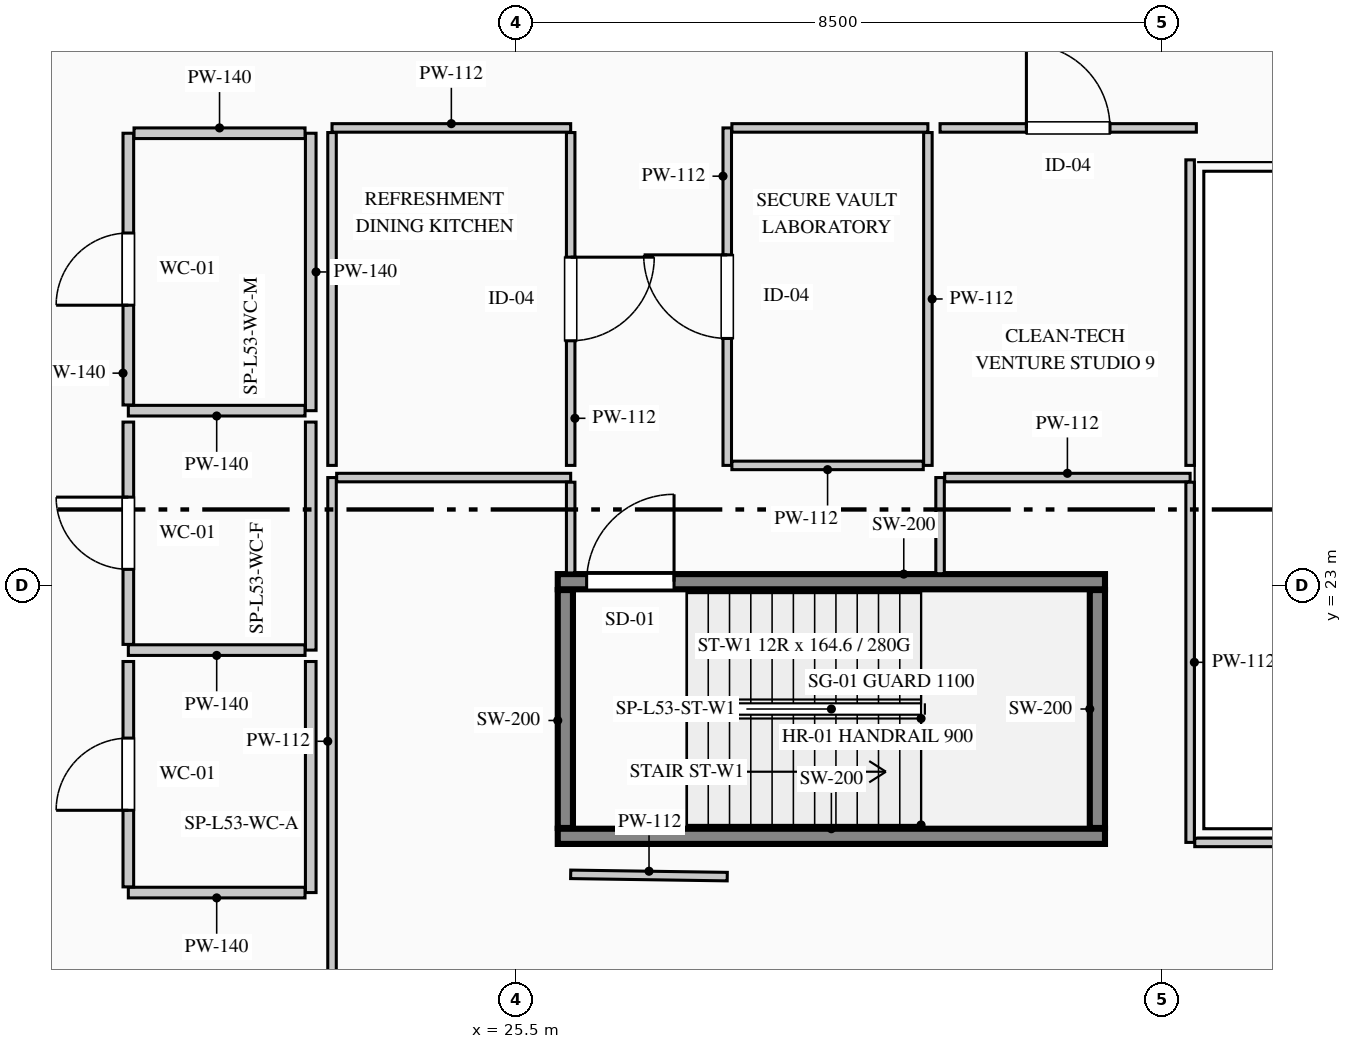
"""IFC4 building model, lengths in metres.
Left out: names, types, materials, properties, quantities, classifications, styles, units other than length and angle.
Written with IfcOpenShell. Run it as: python <this file> out.ifc"""

import sys

from ifc_helpers import new_model, si_unit, direction, frame, frame_2d, origin, place, context, subcontext, project, spatial, rectangle, extrude, element, fill, save


model = new_model("IFC4")
c1 = context("Model", 3, precision=1e-05, world=origin(), true_north=direction((0.0, 1.0)))
c2 = subcontext(c1, "Body", "Model", "MODEL_VIEW")
j1 = project(units=[si_unit("LENGTHUNIT", "METRE"), si_unit("PLANEANGLEUNIT", "RADIAN")], contexts=[c1])
p1 = place(None, origin())
s1 = spatial("IfcSite", under=j1, at=p1, CompositionType="ELEMENT")
p2 = place(p1, origin())
s2 = spatial("IfcBuilding", under=s1, at=p2, CompositionType="ELEMENT")
p3 = place(p2, frame((0.0, 0.0, 223.25)))
s3 = spatial("IfcBuildingStorey", under=s2, at=p3, CompositionType="ELEMENT", Elevation=223.25)
p4 = place(p3, frame((26.05, 19.7, 0.0), z_axis=(0.0, 0.0, 1.0), x_axis=(1.0, 0.0, 0.0)))
e1 = element("IfcWall", 1, at=p4, inside=s3, PredefinedType="SHEAR", context=c2, shape_type="SweptSolid", body=[
    extrude(rectangle(XDim=7.2, YDim=0.2, at=frame_2d((3.6, 0.0))), origin(), (0.0, 0.0, 1.0), 3.95),
])
p5 = place(p3, frame((26.05, 23.05, 0.0), z_axis=(0.0, 0.0, 1.0), x_axis=(1.0, 0.0, 0.0)))
e2 = element("IfcWall", 2, at=p5, inside=s3, PredefinedType="SHEAR", context=c2, shape_type="SweptSolid", body=[
    extrude(rectangle(XDim=7.2, YDim=0.2, at=frame_2d((3.6, 0.0))), origin(), (0.0, 0.0, 1.0), 3.95),
])
p6 = place(p5, frame((0.38, 0.0, 0.0)))
e3 = element("IfcOpeningElement", 3, at=p6, cuts=e2, PredefinedType="OPENING", context=c2, shape_type="SweptSolid", body=[
    extrude(rectangle(XDim=1.15, YDim=2.2, at=frame_2d((0.575, 1.1))), frame((0.0, 0.11, 0.0), z_axis=(0.0, -1.0, 0.0), x_axis=(1.0, 0.0, 0.0)), (0.0, 0.0, 1.0), 0.22),
])
for number, where, z_axis, x_axis in (
    (4, (26.15, 19.81, 0.0), (0.0, 0.0, 1.0), (0.0, 1.0, 0.0)),
    (5, (33.15, 19.81, 0.0), (0.0, 0.0, 1.0), (0.0, 1.0, 0.0)),
):
    element("IfcWall", number, at=place(p3, frame(where, z_axis=z_axis, x_axis=x_axis)), inside=s3, PredefinedType="SHEAR", context=c2, shape_type="SweptSolid", body=[
        extrude(rectangle(XDim=3.13, YDim=0.2, at=frame_2d((1.565, 0.0))), origin(), (0.0, 0.0, 1.0), 3.95),
    ])
p7 = place(p3, frame((22.8, 28.95, 0.0), z_axis=(0.0, 0.0, 1.0), x_axis=(0.0, -1.0, 0.0)))
e6 = element("IfcWall", 6, at=p7, inside=s3, PredefinedType="PARTITIONING", context=c2, shape_type="SweptSolid", body=[
    extrude(rectangle(XDim=3.65, YDim=0.14, at=frame_2d((1.825, 0.0))), origin(), (0.0, 0.0, 1.0), 3.385),
])
p8 = place(p3, frame((22.725, 25.3, 0.0), z_axis=(0.0, 0.0, 1.0), x_axis=(-1.0, 0.0, 0.0)))
e7 = element("IfcWall", 7, at=p8, inside=s3, PredefinedType="PARTITIONING", context=c2, shape_type="SweptSolid", body=[
    extrude(rectangle(XDim=2.325, YDim=0.14, at=frame_2d((1.163, 0.0))), origin(), (0.0, 0.0, 1.0), 3.7),
])
p9 = place(p3, frame((20.4, 25.375, 0.0), z_axis=(0.0, 0.0, 1.0), x_axis=(0.0, 1.0, 0.0)))
e8 = element("IfcWall", 8, at=p9, inside=s3, PredefinedType="PARTITIONING", context=c2, shape_type="SweptSolid", body=[
    extrude(rectangle(XDim=3.575, YDim=0.14, at=frame_2d((1.788, 0.0))), origin(), (0.0, 0.0, 1.0), 3.7),
])
p10 = place(p9, frame((1.312, 0.0, 0.0)))
e9 = element("IfcOpeningElement", 9, at=p10, cuts=e8, PredefinedType="OPENING", context=c2, shape_type="SweptSolid", body=[
    extrude(rectangle(XDim=0.95, YDim=2.15, at=frame_2d((0.475, 1.075))), frame((0.0, 0.08, 0.0), z_axis=(0.0, -1.0, 0.0), x_axis=(1.0, 0.0, 0.0)), (0.0, 0.0, 1.0), 0.16),
])
p11 = place(p3, frame((20.475, 28.95, 0.0), z_axis=(0.0, 0.0, 1.0), x_axis=(1.0, 0.0, 0.0)))
e10 = element("IfcWall", 10, at=p11, inside=s3, PredefinedType="PARTITIONING", context=c2, shape_type="SweptSolid", body=[
    extrude(rectangle(XDim=2.25, YDim=0.14, at=frame_2d((1.125, 0.0))), origin(), (0.0, 0.0, 1.0), 3.7),
])
p12 = place(p3, frame((22.8, 25.15, 0.0), z_axis=(0.0, 0.0, 1.0), x_axis=(0.0, -1.0, 0.0)))
e11 = element("IfcWall", 11, at=p12, inside=s3, PredefinedType="PARTITIONING", context=c2, shape_type="SweptSolid", body=[
    extrude(rectangle(XDim=3.0, YDim=0.14, at=frame_2d((1.5, 0.0))), origin(), (0.0, 0.0, 1.0), 3.385),
])
p13 = place(p3, frame((22.725, 22.15, 0.0), z_axis=(0.0, 0.0, 1.0), x_axis=(-1.0, 0.0, 0.0)))
e12 = element("IfcWall", 12, at=p13, inside=s3, PredefinedType="PARTITIONING", context=c2, shape_type="SweptSolid", body=[
    extrude(rectangle(XDim=2.325, YDim=0.14, at=frame_2d((1.163, 0.0))), origin(), (0.0, 0.0, 1.0), 3.7),
])
p14 = place(p3, frame((20.4, 22.225, 0.0), z_axis=(0.0, 0.0, 1.0), x_axis=(0.0, 1.0, 0.0)))
e13 = element("IfcWall", 13, at=p14, inside=s3, PredefinedType="PARTITIONING", context=c2, shape_type="SweptSolid", body=[
    extrude(rectangle(XDim=2.925, YDim=0.14, at=frame_2d((1.462, 0.0))), origin(), (0.0, 0.0, 1.0), 3.7),
])
p15 = place(p14, frame((0.988, 0.0, 0.0)))
e14 = element("IfcOpeningElement", 14, at=p15, cuts=e13, PredefinedType="OPENING", context=c2, shape_type="SweptSolid", body=[
    extrude(rectangle(XDim=0.95, YDim=2.15, at=frame_2d((0.475, 1.075))), frame((0.0, 0.08, 0.0), z_axis=(0.0, -1.0, 0.0), x_axis=(1.0, 0.0, 0.0)), (0.0, 0.0, 1.0), 0.16),
])
p16 = place(p3, frame((22.8, 22.0, 0.0), z_axis=(0.0, 0.0, 1.0), x_axis=(0.0, -1.0, 0.0)))
e15 = element("IfcWall", 15, at=p16, inside=s3, PredefinedType="PARTITIONING", context=c2, shape_type="SweptSolid", body=[
    extrude(rectangle(XDim=3.04, YDim=0.14, at=frame_2d((1.52, 0.0))), origin(), (0.0, 0.0, 1.0), 3.385),
])
p17 = place(p3, frame((22.725, 18.96, 0.0), z_axis=(0.0, 0.0, 1.0), x_axis=(-1.0, 0.0, 0.0)))
e16 = element("IfcWall", 16, at=p17, inside=s3, PredefinedType="PARTITIONING", context=c2, shape_type="SweptSolid", body=[
    extrude(rectangle(XDim=2.325, YDim=0.14, at=frame_2d((1.163, 0.0))), origin(), (0.0, 0.0, 1.0), 3.7),
])
p18 = place(p3, frame((20.4, 19.035, 0.0), z_axis=(0.0, 0.0, 1.0), x_axis=(0.0, 1.0, 0.0)))
e17 = element("IfcWall", 17, at=p18, inside=s3, PredefinedType="PARTITIONING", context=c2, shape_type="SweptSolid", body=[
    extrude(rectangle(XDim=2.965, YDim=0.14, at=frame_2d((1.482, 0.0))), origin(), (0.0, 0.0, 1.0), 3.7),
])
p19 = place(p18, frame((1.008, 0.0, 0.0)))
e18 = element("IfcOpeningElement", 18, at=p19, cuts=e17, PredefinedType="OPENING", context=c2, shape_type="SweptSolid", body=[
    extrude(rectangle(XDim=0.95, YDim=2.15, at=frame_2d((0.475, 1.075))), frame((0.0, 0.08, 0.0), z_axis=(0.0, -1.0, 0.0), x_axis=(1.0, 0.0, 0.0)), (0.0, 0.0, 1.0), 0.16),
])
p20 = place(p3, frame((31.08, 23.155, 0.0), z_axis=(0.0, 0.0, 1.0), x_axis=(0.0, 1.0, 0.0)))
e19 = element("IfcWall", 19, at=p20, inside=s3, PredefinedType="PARTITIONING", context=c2, shape_type="SweptSolid", body=[
    extrude(rectangle(XDim=1.265, YDim=0.112, at=frame_2d((0.632, 0.0))), origin(), (0.0, 0.0, 1.0), 3.7),
])
p21 = place(p3, frame((31.141, 24.42, 0.0), z_axis=(0.0, 0.0, 1.0), x_axis=(1.0, 0.0, 0.0)))
e20 = element("IfcWall", 20, at=p21, inside=s3, PredefinedType="PARTITIONING", context=c2, shape_type="SweptSolid", body=[
    extrude(rectangle(XDim=3.229, YDim=0.112, at=frame_2d((1.615, 0.0))), origin(), (0.0, 0.0, 1.0), 3.385),
])
p22 = place(p3, frame((34.37, 24.359, 0.0), z_axis=(0.0, 0.0, 1.0), x_axis=(0.0, -1.0, 0.0)))
e21 = element("IfcWall", 21, at=p22, inside=s3, PredefinedType="PARTITIONING", context=c2, shape_type="SweptSolid", body=[
    extrude(rectangle(XDim=4.739, YDim=0.112, at=frame_2d((2.369, 0.0))), origin(), (0.0, 0.0, 1.0), 3.7),
])
p23 = place(p3, frame((34.431, 19.62, 0.0), z_axis=(0.0, 0.0, 1.0), x_axis=(1.0, 0.0, 0.0)))
e22 = element("IfcWall", 22, at=p23, inside=s3, PredefinedType="PARTITIONING", context=c2, shape_type="SweptSolid", body=[
    extrude(rectangle(XDim=4.989, YDim=0.112, at=frame_2d((2.495, 0.0))), origin(), (0.0, 0.0, 1.0), 3.7),
])
p24 = place(p3, frame((23.08, 17.481, 0.0), z_axis=(0.0, 0.0, 1.0), x_axis=(0.0, 1.0, 0.0)))
e23 = element("IfcWall", 23, at=p24, inside=s3, PredefinedType="PARTITIONING", context=c2, shape_type="SweptSolid", body=[
    extrude(rectangle(XDim=6.939, YDim=0.112, at=frame_2d((3.469, 0.0))), origin(), (0.0, 0.0, 1.0), 3.385),
])
p25 = place(p3, frame((23.141, 24.42, 0.0), z_axis=(0.0, 0.0, 1.0), x_axis=(1.0, 0.0, 0.0)))
e24 = element("IfcWall", 24, at=p25, inside=s3, PredefinedType="PARTITIONING", context=c2, shape_type="SweptSolid", body=[
    extrude(rectangle(XDim=3.079, YDim=0.112, at=frame_2d((1.54, 0.0))), origin(), (0.0, 0.0, 1.0), 3.385),
])
p26 = place(p3, frame((26.22, 24.359, 0.0), z_axis=(0.0, 0.0, 1.0), x_axis=(0.0, -1.0, 0.0)))
e25 = element("IfcWall", 25, at=p26, inside=s3, PredefinedType="PARTITIONING", context=c2, shape_type="SweptSolid", body=[
    extrude(rectangle(XDim=1.194, YDim=0.112, at=frame_2d((0.597, 0.0))), origin(), (0.0, 0.0, 1.0), 3.7),
])
p27 = place(p3, frame((26.22, 19.2, 0.0), z_axis=(0.0, 0.0, 1.0), x_axis=(0.999893773718, -0.014575365509, 0.0)))
e26 = element("IfcWall", 26, at=p27, inside=s3, PredefinedType="PARTITIONING", context=c2, shape_type="SweptSolid", body=[
    extrude(rectangle(XDim=2.06, YDim=0.112, at=frame_2d((1.03, 0.0))), origin(), (0.0, 0.0, 1.0), 3.385),
])
p28 = place(p3, frame((23.08, 29.02, 0.0), z_axis=(0.0, 0.0, 1.0), x_axis=(1.0, 0.0, 0.0)))
e27 = element("IfcWall", 27, at=p28, inside=s3, PredefinedType="PARTITIONING", context=c2, shape_type="SweptSolid", body=[
    extrude(rectangle(XDim=3.14, YDim=0.112, at=frame_2d((1.57, 0.0))), origin(), (0.0, 0.0, 1.0), 3.385),
])
p29 = place(p3, frame((26.22, 28.959, 0.0), z_axis=(0.0, 0.0, 1.0), x_axis=(0.0, -1.0, 0.0)))
e28 = element("IfcWall", 28, at=p29, inside=s3, PredefinedType="PARTITIONING", context=c2, shape_type="SweptSolid", body=[
    extrude(rectangle(XDim=4.379, YDim=0.112, at=frame_2d((2.189, 0.0))), origin(), (0.0, 0.0, 1.0), 3.7),
])
p30 = place(p29, frame((1.639, 0.0, 0.0)))
e29 = element("IfcOpeningElement", 29, at=p30, cuts=e28, PredefinedType="OPENING", context=c2, shape_type="SweptSolid", body=[
    extrude(rectangle(XDim=1.1, YDim=2.2, at=frame_2d((0.55, 1.1))), frame((0.0, 0.066, 0.0), z_axis=(0.0, -1.0, 0.0), x_axis=(1.0, 0.0, 0.0)), (0.0, 0.0, 1.0), 0.132),
])
p31 = place(p3, frame((23.08, 24.58, 0.0), z_axis=(0.0, 0.0, 1.0), x_axis=(0.0, 1.0, 0.0)))
e30 = element("IfcWall", 30, at=p31, inside=s3, PredefinedType="PARTITIONING", context=c2, shape_type="SweptSolid", body=[
    extrude(rectangle(XDim=4.379, YDim=0.112, at=frame_2d((2.189, 0.0))), origin(), (0.0, 0.0, 1.0), 3.385),
])
p32 = place(p3, frame((28.28, 24.58, 0.0), z_axis=(0.0, 0.0, 1.0), x_axis=(0.0, 1.0, 0.0)))
e31 = element("IfcWall", 31, at=p32, inside=s3, PredefinedType="PARTITIONING", context=c2, shape_type="SweptSolid", body=[
    extrude(rectangle(XDim=4.44, YDim=0.112, at=frame_2d((2.22, 0.0))), origin(), (0.0, 0.0, 1.0), 3.7),
])
p33 = place(p32, frame((1.67, 0.0, 0.0)))
e32 = element("IfcOpeningElement", 32, at=p33, cuts=e31, PredefinedType="OPENING", context=c2, shape_type="SweptSolid", body=[
    extrude(rectangle(XDim=1.1, YDim=2.2, at=frame_2d((0.55, 1.1))), frame((0.0, 0.066, 0.0), z_axis=(0.0, -1.0, 0.0), x_axis=(1.0, 0.0, 0.0)), (0.0, 0.0, 1.0), 0.132),
])
p34 = place(p3, frame((28.341, 29.02, 0.0), z_axis=(0.0, 0.0, 1.0), x_axis=(1.0, 0.0, 0.0)))
e33 = element("IfcWall", 33, at=p34, inside=s3, PredefinedType="PARTITIONING", context=c2, shape_type="SweptSolid", body=[
    extrude(rectangle(XDim=2.579, YDim=0.112, at=frame_2d((1.29, 0.0))), origin(), (0.0, 0.0, 1.0), 3.385),
])
p35 = place(p3, frame((30.92, 28.959, 0.0), z_axis=(0.0, 0.0, 1.0), x_axis=(0.0, -1.0, 0.0)))
e34 = element("IfcWall", 34, at=p35, inside=s3, PredefinedType="PARTITIONING", context=c2, shape_type="SweptSolid", body=[
    extrude(rectangle(XDim=4.379, YDim=0.112, at=frame_2d((2.189, 0.0))), origin(), (0.0, 0.0, 1.0), 3.7),
])
p36 = place(p3, frame((30.859, 24.58, 0.0), z_axis=(0.0, 0.0, 1.0), x_axis=(-1.0, 0.0, 0.0)))
e35 = element("IfcWall", 35, at=p36, inside=s3, PredefinedType="PARTITIONING", context=c2, shape_type="SweptSolid", body=[
    extrude(rectangle(XDim=2.518, YDim=0.112, at=frame_2d((1.259, 0.0))), origin(), (0.0, 0.0, 1.0), 3.485),
])
p37 = place(p3, frame((34.37, 28.6, 0.0), z_axis=(0.0, 0.0, 1.0), x_axis=(0.0, -1.0, 0.0)))
e36 = element("IfcWall", 36, at=p37, inside=s3, PredefinedType="PARTITIONING", context=c2, shape_type="SweptSolid", body=[
    extrude(rectangle(XDim=4.02, YDim=0.112, at=frame_2d((2.01, 0.0))), origin(), (0.0, 0.0, 1.0), 3.7),
])
p38 = place(p3, frame((31.08, 29.02, 0.0), z_axis=(0.0, 0.0, 1.0), x_axis=(1.0, 0.0, 0.0)))
e37 = element("IfcWall", 37, at=p38, inside=s3, PredefinedType="PARTITIONING", context=c2, shape_type="SweptSolid", body=[
    extrude(rectangle(XDim=3.372, YDim=0.112, at=frame_2d((1.686, 0.0))), origin(), (0.0, 0.0, 1.0), 3.385),
])
p39 = place(p38, frame((1.136, 0.0, 0.0)))
e38 = element("IfcOpeningElement", 38, at=p39, cuts=e37, PredefinedType="OPENING", context=c2, shape_type="SweptSolid", body=[
    extrude(rectangle(XDim=1.1, YDim=2.2, at=frame_2d((0.55, 1.1))), frame((0.0, 0.066, 0.0), z_axis=(0.0, -1.0, 0.0), x_axis=(1.0, 0.0, 0.0)), (0.0, 0.0, 1.0), 0.132),
])
p40 = place(p6, origin())
e39 = element("IfcDoor", 39, at=p40, inside=s3, OperationType="SINGLE_SWING_RIGHT", PredefinedType="DOOR", context=c2, shape_type="SweptSolid", body=[
    extrude(rectangle(XDim=1.15, YDim=2.2, at=frame_2d((0.575, 1.1))), frame((0.0, 0.025, 0.0), z_axis=(0.0, -1.0, 0.0), x_axis=(1.0, 0.0, 0.0)), (0.0, 0.0, 1.0), 0.05),
])
fill(e3, e39)
p41 = place(p10, origin())
e40 = element("IfcDoor", 40, at=p41, inside=s3, OperationType="SINGLE_SWING_LEFT", PredefinedType="DOOR", context=c2, shape_type="SweptSolid", body=[
    extrude(rectangle(XDim=0.95, YDim=2.15, at=frame_2d((0.475, 1.075))), frame((0.0, 0.025, 0.0), z_axis=(0.0, -1.0, 0.0), x_axis=(1.0, 0.0, 0.0)), (0.0, 0.0, 1.0), 0.05),
])
fill(e9, e40)
p42 = place(p15, origin())
e41 = element("IfcDoor", 41, at=p42, inside=s3, OperationType="SINGLE_SWING_RIGHT", PredefinedType="DOOR", context=c2, shape_type="SweptSolid", body=[
    extrude(rectangle(XDim=0.95, YDim=2.15, at=frame_2d((0.475, 1.075))), frame((0.0, 0.025, 0.0), z_axis=(0.0, -1.0, 0.0), x_axis=(1.0, 0.0, 0.0)), (0.0, 0.0, 1.0), 0.05),
])
fill(e14, e41)
p43 = place(p19, origin())
e42 = element("IfcDoor", 42, at=p43, inside=s3, OperationType="SINGLE_SWING_LEFT", PredefinedType="DOOR", context=c2, shape_type="SweptSolid", body=[
    extrude(rectangle(XDim=0.95, YDim=2.15, at=frame_2d((0.475, 1.075))), frame((0.0, 0.025, 0.0), z_axis=(0.0, -1.0, 0.0), x_axis=(1.0, 0.0, 0.0)), (0.0, 0.0, 1.0), 0.05),
])
fill(e18, e42)
p44 = place(p30, origin())
e43 = element("IfcDoor", 43, at=p44, inside=s3, OperationType="SINGLE_SWING_LEFT", PredefinedType="DOOR", context=c2, shape_type="SweptSolid", body=[
    extrude(rectangle(XDim=1.1, YDim=2.2, at=frame_2d((0.55, 1.1))), frame((0.0, 0.025, 0.0), z_axis=(0.0, -1.0, 0.0), x_axis=(1.0, 0.0, 0.0)), (0.0, 0.0, 1.0), 0.05),
])
fill(e29, e43)
p45 = place(p33, origin())
e44 = element("IfcDoor", 44, at=p45, inside=s3, OperationType="SINGLE_SWING_RIGHT", PredefinedType="DOOR", context=c2, shape_type="SweptSolid", body=[
    extrude(rectangle(XDim=1.1, YDim=2.2, at=frame_2d((0.55, 1.1))), frame((0.0, 0.025, 0.0), z_axis=(0.0, -1.0, 0.0), x_axis=(1.0, 0.0, 0.0)), (0.0, 0.0, 1.0), 0.05),
])
fill(e32, e44)
p46 = place(p39, origin())
e45 = element("IfcDoor", 45, at=p46, inside=s3, OperationType="SINGLE_SWING_LEFT", PredefinedType="DOOR", context=c2, shape_type="SweptSolid", body=[
    extrude(rectangle(XDim=1.1, YDim=2.2, at=frame_2d((0.55, 1.1))), frame((0.0, 0.025, 0.0), z_axis=(0.0, -1.0, 0.0), x_axis=(1.0, 0.0, 0.0)), (0.0, 0.0, 1.0), 0.05),
])
fill(e38, e45)
save(model, sys.argv[1])
